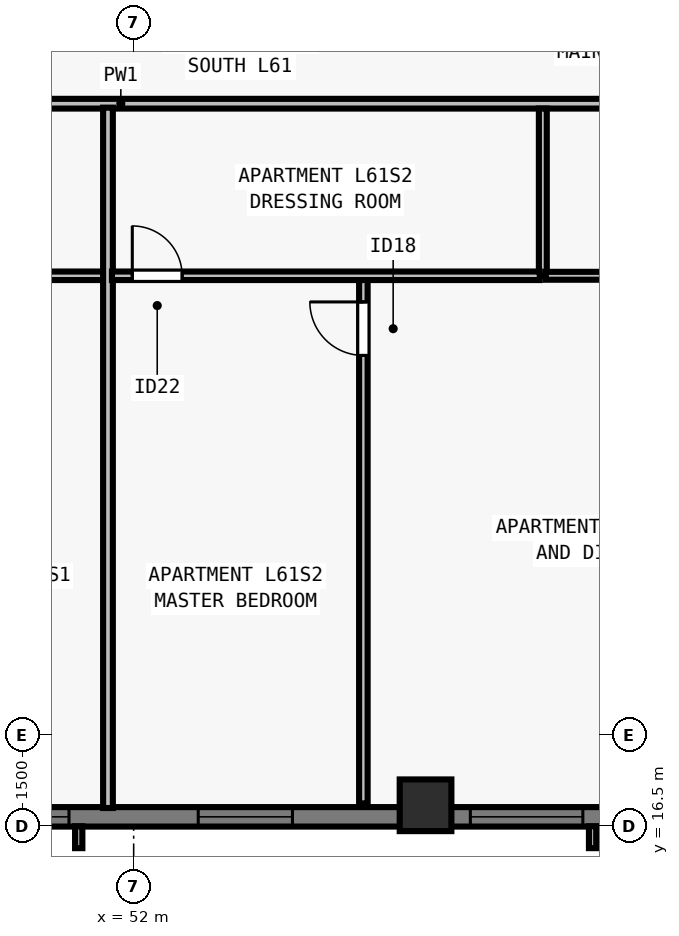
"""IFC4 building model, lengths in metres.
Left out: names, types, materials, properties, quantities, classifications, styles, units other than length and angle.
Written with IfcOpenShell. Run it as: python <this file> out.ifc"""

import sys

from ifc_helpers import new_model, si_unit, direction, frame, frame_2d, origin, origin_2d, place, context, subcontext, project, spatial, rectangle, extrude, element, fill, save


model = new_model("IFC4")
c1 = context("Model", 3, precision=1e-05, world=origin(), true_north=direction((0.0, 1.0)))
c2 = subcontext(c1, "Body", "Model", "MODEL_VIEW")
j1 = project(units=[si_unit("LENGTHUNIT", "METRE"), si_unit("PLANEANGLEUNIT", "RADIAN")], contexts=[c1])
p1 = place(None, origin())
s1 = spatial("IfcSite", under=j1, at=p1, CompositionType="ELEMENT")
p2 = place(p1, origin())
s2 = spatial("IfcBuilding", under=s1, at=p2, CompositionType="ELEMENT")
p3 = place(p2, frame((0.0, 0.0, 223.5)))
s3 = spatial("IfcBuildingStorey", under=s2, at=p3, CompositionType="ELEMENT", Elevation=223.5)
p4 = place(p3, frame((56.8, 16.85, 0.0), z_axis=(0.0, 0.0, 1.0), x_axis=(1.0, 0.0, 0.0)))
e1 = element("IfcColumn", 1, at=p4, inside=s3, PredefinedType="COLUMN", context=c2, shape_type="SweptSolid", body=[
    extrude(rectangle(XDim=0.85, YDim=0.85, at=origin_2d()), origin(), (0.0, 0.0, 1.0), 3.5),
])
p5 = place(p3, frame((69.5, 16.66, 0.0), z_axis=(0.0, 0.0, 1.0), x_axis=(-1.0, 0.0, 0.0)))
e2 = element("IfcWall", 2, at=p5, inside=s3, PredefinedType="SOLIDWALL", context=c2, shape_type="SweptSolid", body=[
    extrude(rectangle(XDim=34.702, YDim=0.32, at=frame_2d((17.351, 0.0))), origin(), (0.0, 0.0, 1.0), 3.29),
])
p6 = place(p5, frame((5.863, 0.0, 0.8)))
e3 = element("IfcOpeningElement", 3, at=p6, cuts=e2, PredefinedType="OPENING", context=c2, shape_type="SweptSolid", body=[
    extrude(rectangle(XDim=1.85, YDim=1.678, at=frame_2d((0.925, 0.839))), frame((0.0, 0.17, 0.0), z_axis=(0.0, -1.0, 0.0), x_axis=(1.0, 0.0, 0.0)), (0.0, 0.0, 1.0), 0.34),
])
p7 = place(p5, frame((8.138, 0.0, 0.8)))
e4 = element("IfcOpeningElement", 4, at=p7, cuts=e2, PredefinedType="OPENING", context=c2, shape_type="SweptSolid", body=[
    extrude(rectangle(XDim=1.55, YDim=1.678, at=frame_2d((0.775, 0.839))), frame((0.0, 0.17, 0.0), z_axis=(0.0, -1.0, 0.0), x_axis=(1.0, 0.0, 0.0)), (0.0, 0.0, 1.0), 0.34),
])
p8 = place(p5, frame((10.113, 0.0, 0.8)))
e5 = element("IfcOpeningElement", 5, at=p8, cuts=e2, PredefinedType="OPENING", context=c2, shape_type="SweptSolid", body=[
    extrude(rectangle(XDim=1.85, YDim=1.678, at=frame_2d((0.925, 0.839))), frame((0.0, 0.17, 0.0), z_axis=(0.0, -1.0, 0.0), x_axis=(1.0, 0.0, 0.0)), (0.0, 0.0, 1.0), 0.34),
])
p9 = place(p5, frame((14.888, 0.0, 0.8)))
e6 = element("IfcOpeningElement", 6, at=p9, cuts=e2, PredefinedType="OPENING", context=c2, shape_type="SweptSolid", body=[
    extrude(rectangle(XDim=1.55, YDim=1.678, at=frame_2d((0.775, 0.839))), frame((0.0, 0.17, 0.0), z_axis=(0.0, -1.0, 0.0), x_axis=(1.0, 0.0, 0.0)), (0.0, 0.0, 1.0), 0.34),
])
p10 = place(p5, frame((18.564, 0.0, 0.8)))
e7 = element("IfcOpeningElement", 7, at=p10, cuts=e2, PredefinedType="OPENING", context=c2, shape_type="SweptSolid", body=[
    extrude(rectangle(XDim=1.85, YDim=1.678, at=frame_2d((0.925, 0.839))), frame((0.0, 0.17, 0.0), z_axis=(0.0, -1.0, 0.0), x_axis=(1.0, 0.0, 0.0)), (0.0, 0.0, 1.0), 0.34),
])
p11 = place(p5, frame((24.414, 0.0, 0.8)))
e8 = element("IfcOpeningElement", 8, at=p11, cuts=e2, PredefinedType="OPENING", context=c2, shape_type="SweptSolid", body=[
    extrude(rectangle(XDim=1.85, YDim=1.678, at=frame_2d((0.925, 0.839))), frame((0.0, 0.17, 0.0), z_axis=(0.0, -1.0, 0.0), x_axis=(1.0, 0.0, 0.0)), (0.0, 0.0, 1.0), 0.34),
])
p12 = place(p5, frame((28.389, 0.0, 0.8)))
e9 = element("IfcOpeningElement", 9, at=p12, cuts=e2, PredefinedType="OPENING", context=c2, shape_type="SweptSolid", body=[
    extrude(rectangle(XDim=1.55, YDim=1.678, at=frame_2d((0.775, 0.839))), frame((0.0, 0.17, 0.0), z_axis=(0.0, -1.0, 0.0), x_axis=(1.0, 0.0, 0.0)), (0.0, 0.0, 1.0), 0.34),
])
p13 = place(p3, frame((29.805, 28.387, 0.0), z_axis=(0.0, 0.0, 1.0), x_axis=(1.0, 0.0, 0.0)))
e10 = element("IfcWall", 10, at=p13, inside=s3, PredefinedType="PARTITIONING", context=c2, shape_type="SweptSolid", body=[
    extrude(rectangle(XDim=44.39, YDim=0.16, at=frame_2d((22.195, 0.0))), origin(), (0.0, 0.0, 1.0), 2.958),
])
p14 = place(p13, frame((10.464, 0.0, 0.0)))
e11 = element("IfcOpeningElement", 11, at=p14, cuts=e10, PredefinedType="OPENING", context=c2, shape_type="SweptSolid", body=[
    extrude(rectangle(XDim=0.96, YDim=2.18, at=frame_2d((0.48, 1.09))), frame((0.0, 0.09, 0.0), z_axis=(0.0, -1.0, 0.0), x_axis=(1.0, 0.0, 0.0)), (0.0, 0.0, 1.0), 0.18),
])
p15 = place(p13, frame((32.544, 0.0, 0.0)))
e12 = element("IfcOpeningElement", 12, at=p15, cuts=e10, PredefinedType="OPENING", context=c2, shape_type="SweptSolid", body=[
    extrude(rectangle(XDim=0.96, YDim=2.18, at=frame_2d((0.48, 1.09))), frame((0.0, 0.09, 0.0), z_axis=(0.0, -1.0, 0.0), x_axis=(1.0, 0.0, 0.0)), (0.0, 0.0, 1.0), 0.18),
])
p16 = place(p3, frame((45.199, 25.558, 0.0), z_axis=(0.0, 0.0, 1.0), x_axis=(1.0, 0.0, 0.0)))
e13 = element("IfcWall", 13, at=p16, inside=s3, PredefinedType="PARTITIONING", context=c2, shape_type="SweptSolid", body=[
    extrude(rectangle(XDim=6.429, YDim=0.14, at=frame_2d((3.214, 0.0))), origin(), (0.0, 0.0, 1.0), 3.29),
])
p17 = place(p16, frame((0.4, 0.0, 0.0)))
e14 = element("IfcOpeningElement", 14, at=p17, cuts=e13, PredefinedType="OPENING", context=c2, shape_type="SweptSolid", body=[
    extrude(rectangle(XDim=0.82, YDim=2.1, at=frame_2d((0.41, 1.05))), frame((0.0, 0.08, 0.0), z_axis=(0.0, -1.0, 0.0), x_axis=(1.0, 0.0, 0.0)), (0.0, 0.0, 1.0), 0.16),
])
p18 = place(p3, frame((51.577, 16.805, 0.0), z_axis=(0.0, 0.0, 1.0), x_axis=(0.0, 1.0, 0.0)))
e15 = element("IfcWall", 15, at=p18, inside=s3, PredefinedType="PARTITIONING", context=c2, shape_type="SweptSolid", body=[
    extrude(rectangle(XDim=11.518, YDim=0.16, at=frame_2d((5.759, 0.0))), origin(), (0.0, 0.0, 1.0), 2.958),
])
p19 = place(p3, frame((58.729, 25.558, 0.0), z_axis=(0.0, 0.0, 1.0), x_axis=(0.0, 1.0, 0.0)))
e16 = element("IfcWall", 16, at=p19, inside=s3, PredefinedType="PLUMBINGWALL", context=c2, shape_type="SweptSolid", body=[
    extrude(rectangle(XDim=2.75, YDim=0.13, at=frame_2d((1.375, 0.0))), origin(), (0.0, 0.0, 1.0), 3.29),
])
p20 = place(p3, frame((58.779, 25.558, 0.0), z_axis=(0.0, 0.0, 1.0), x_axis=(1.0, 0.0, 0.0)))
e17 = element("IfcWall", 17, at=p20, inside=s3, PredefinedType="PLUMBINGWALL", context=c2, shape_type="SweptSolid", body=[
    extrude(rectangle(XDim=2.85, YDim=0.13, at=frame_2d((1.425, 0.0))), origin(), (0.0, 0.0, 1.0), 3.29),
])
p21 = place(p3, frame((55.778, 16.88, 0.0), z_axis=(0.0, 0.0, 1.0), x_axis=(0.0, 1.0, 0.0)))
e18 = element("IfcWall", 18, at=p21, inside=s3, PredefinedType="PARTITIONING", context=c2, shape_type="SweptSolid", body=[
    extrude(rectangle(XDim=8.718, YDim=0.14, at=frame_2d((4.359, 0.0))), origin(), (0.0, 0.0, 1.0), 3.29),
])
p22 = place(p21, frame((7.367, 0.0, 0.0)))
e19 = element("IfcOpeningElement", 19, at=p22, cuts=e18, PredefinedType="OPENING", context=c2, shape_type="SweptSolid", body=[
    extrude(rectangle(XDim=0.88, YDim=2.1, at=frame_2d((0.44, 1.05))), frame((0.0, 0.08, 0.0), z_axis=(0.0, -1.0, 0.0), x_axis=(1.0, 0.0, 0.0)), (0.0, 0.0, 1.0), 0.16),
])
p23 = place(p3, frame((51.643, 25.558, 0.0), z_axis=(0.0, 0.0, 1.0), x_axis=(1.0, 0.0, 0.0)))
e20 = element("IfcWall", 20, at=p23, inside=s3, PredefinedType="PARTITIONING", context=c2, shape_type="SweptSolid", body=[
    extrude(rectangle(XDim=7.036, YDim=0.14, at=frame_2d((3.518, 0.0))), origin(), (0.0, 0.0, 1.0), 3.29),
])
p24 = place(p23, frame((0.335, 0.0, 0.0)))
e21 = element("IfcOpeningElement", 21, at=p24, cuts=e20, PredefinedType="OPENING", context=c2, shape_type="SweptSolid", body=[
    extrude(rectangle(XDim=0.82, YDim=2.1, at=frame_2d((0.41, 1.05))), frame((0.0, 0.08, 0.0), z_axis=(0.0, -1.0, 0.0), x_axis=(1.0, 0.0, 0.0)), (0.0, 0.0, 1.0), 0.16),
])
p25 = place(p8, origin())
e22 = element("IfcWindow", 22, at=p25, inside=s3, PartitioningType="SINGLE_PANEL", PredefinedType="WINDOW", context=c2, shape_type="SweptSolid", body=[
    extrude(rectangle(XDim=1.85, YDim=1.678, at=frame_2d((0.925, 0.839))), frame((0.0, -0.05, 0.0), z_axis=(0.0, -1.0, 0.0), x_axis=(1.0, 0.0, 0.0)), (0.0, 0.0, 1.0), 0.06),
])
fill(e5, e22)
p26 = place(p9, origin())
e23 = element("IfcWindow", 23, at=p26, inside=s3, PartitioningType="SINGLE_PANEL", PredefinedType="WINDOW", context=c2, shape_type="SweptSolid", body=[
    extrude(rectangle(XDim=1.55, YDim=1.678, at=frame_2d((0.775, 0.839))), frame((0.0, -0.05, 0.0), z_axis=(0.0, -1.0, 0.0), x_axis=(1.0, 0.0, 0.0)), (0.0, 0.0, 1.0), 0.06),
])
fill(e6, e23)
p27 = place(p10, origin())
e24 = element("IfcWindow", 24, at=p27, inside=s3, PartitioningType="SINGLE_PANEL", PredefinedType="WINDOW", context=c2, shape_type="SweptSolid", body=[
    extrude(rectangle(XDim=1.85, YDim=1.678, at=frame_2d((0.925, 0.839))), frame((0.0, -0.05, 0.0), z_axis=(0.0, -1.0, 0.0), x_axis=(1.0, 0.0, 0.0)), (0.0, 0.0, 1.0), 0.06),
])
fill(e7, e24)
p28 = place(p24, origin())
e25 = element("IfcDoor", 25, at=p28, inside=s3, OperationType="SINGLE_SWING_LEFT", PredefinedType="DOOR", context=c2, shape_type="SweptSolid", body=[
    extrude(rectangle(XDim=0.82, YDim=2.1, at=frame_2d((0.41, 1.05))), frame((0.0, 0.025, 0.0), z_axis=(0.0, -1.0, 0.0), x_axis=(1.0, 0.0, 0.0)), (0.0, 0.0, 1.0), 0.05),
])
fill(e21, e25)
p29 = place(p22, origin())
e26 = element("IfcDoor", 26, at=p29, inside=s3, OperationType="SINGLE_SWING_RIGHT", PredefinedType="DOOR", context=c2, shape_type="SweptSolid", body=[
    extrude(rectangle(XDim=0.88, YDim=2.1, at=frame_2d((0.44, 1.05))), frame((0.0, 0.025, 0.0), z_axis=(0.0, -1.0, 0.0), x_axis=(1.0, 0.0, 0.0)), (0.0, 0.0, 1.0), 0.05),
])
fill(e19, e26)
save(model, sys.argv[1])
